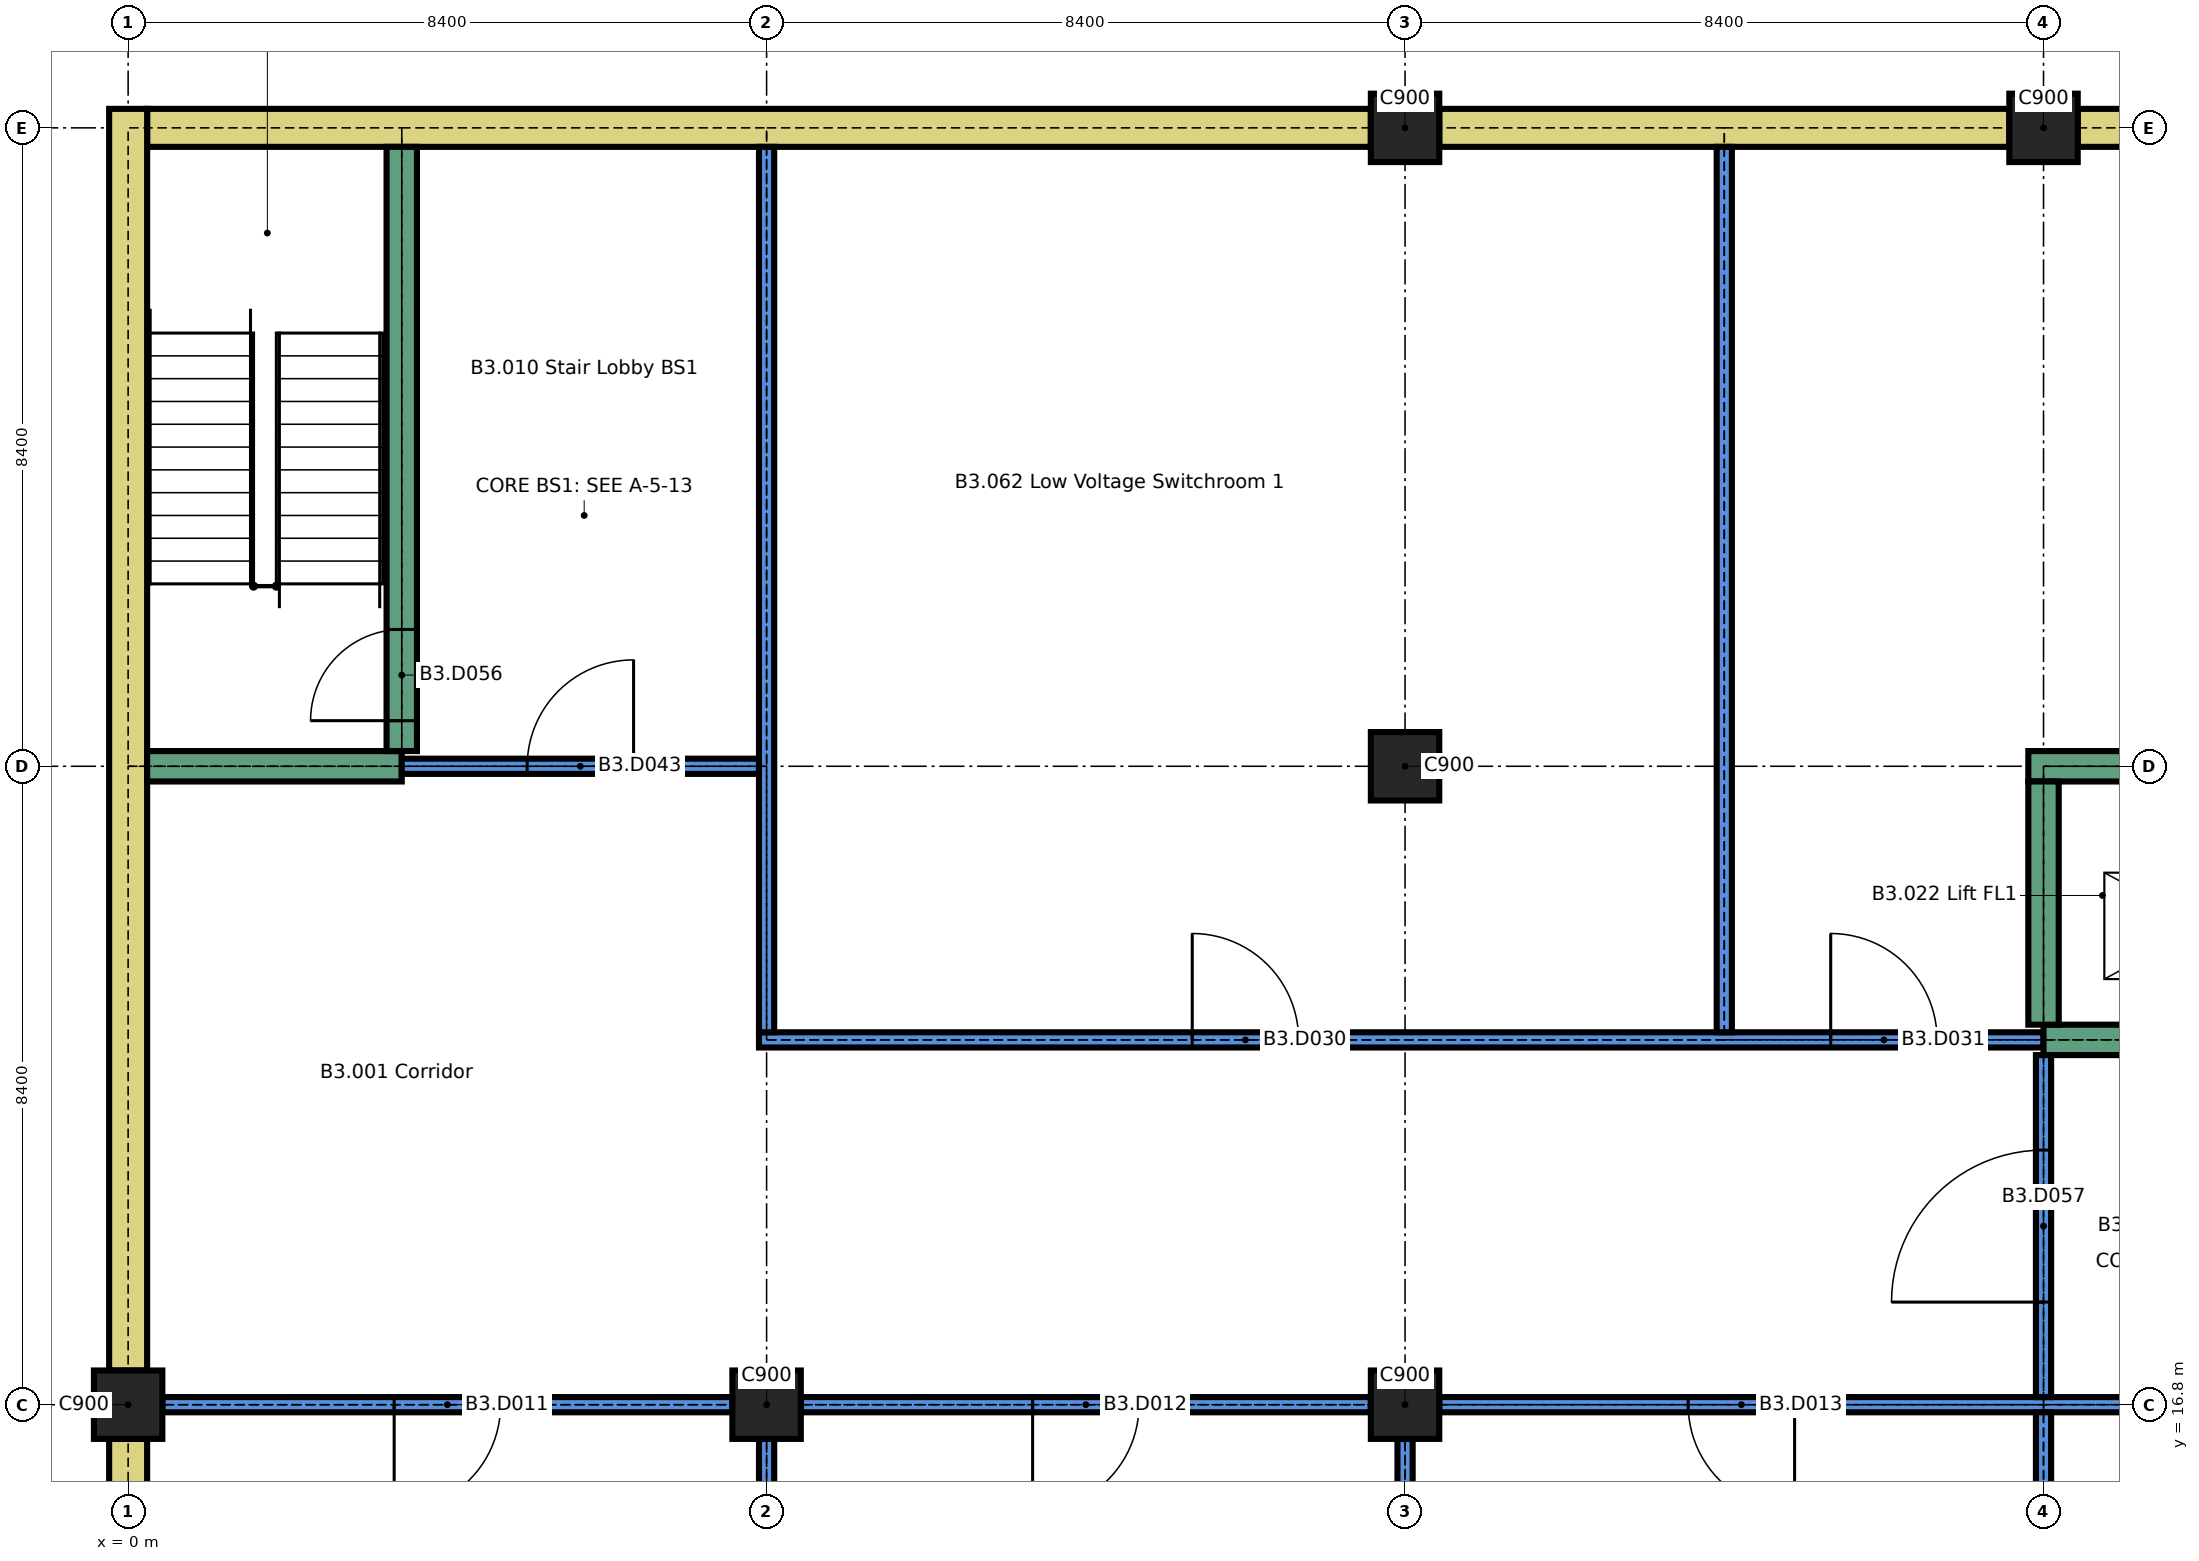
"""IFC4 building model, lengths in metres.
Left out: names, types, materials, properties, quantities, classifications, styles, units other than length and angle.
Written with IfcOpenShell. Run it as: python <this file> out.ifc"""

import sys

from ifc_helpers import new_model, si_unit, direction, frame, frame_2d, origin, origin_2d, place, context, subcontext, project, spatial, rectangle, extrude, element, fill, save


model = new_model("IFC4")
c1 = context("Model", 3, precision=1e-05, world=origin(), true_north=direction((0.0, 1.0)))
c2 = subcontext(c1, "Body", "Model", "MODEL_VIEW")
j1 = project(units=[si_unit("LENGTHUNIT", "METRE"), si_unit("PLANEANGLEUNIT", "RADIAN")], contexts=[c1])
p1 = place(None, origin())
s1 = spatial("IfcSite", under=j1, at=p1, CompositionType="ELEMENT")
p2 = place(p1, origin())
s2 = spatial("IfcBuilding", under=s1, at=p2, CompositionType="ELEMENT")
p3 = place(p2, frame((0.0, 0.0, -11.4)))
s3 = spatial("IfcBuildingStorey", under=s2, at=p3, CompositionType="ELEMENT", Elevation=-11.4)
for number, where, z_axis, x_axis in (
    (1, (0.0, 16.8, 0.0), (0.0, 0.0, 1.0), (1.0, 0.0, 0.0)),
    (2, (8.4, 16.8, 0.0), (0.0, 0.0, 1.0), (1.0, 0.0, 0.0)),
    (3, (16.8, 16.8, 0.0), (0.0, 0.0, 1.0), (1.0, 0.0, 0.0)),
    (4, (16.8, 25.2, 0.0), (0.0, 0.0, 1.0), (1.0, 0.0, 0.0)),
    (5, (16.8, 33.6, 0.0), (0.0, 0.0, 1.0), (1.0, 0.0, 0.0)),
    (6, (25.2, 33.6, 0.0), (0.0, 0.0, 1.0), (1.0, 0.0, 0.0)),
):
    element("IfcColumn", number, at=place(p3, frame(where, z_axis=z_axis, x_axis=x_axis)), inside=s3, PredefinedType="COLUMN", context=c2, shape_type="SweptSolid", body=[
        extrude(rectangle(XDim=0.9, YDim=0.9, at=origin_2d()), origin(), (0.0, 0.0, 1.0), 3.2),
    ])
p4 = place(p3, frame((0.25, 33.6, 0.0), z_axis=(0.0, 0.0, 1.0), x_axis=(1.0, 0.0, 0.0)))
e7 = element("IfcWall", 7, at=p4, inside=s3, PredefinedType="SOLIDWALL", context=c2, shape_type="SweptSolid", body=[
    extrude(rectangle(XDim=16.1, YDim=0.5, at=frame_2d((8.05, 0.0))), origin(), (0.0, 0.0, 1.0), 3.2),
])
for number, where, z_axis, x_axis in (
    (8, (17.25, 33.6, 0.0), (0.0, 0.0, 1.0), (1.0, 0.0, 0.0)),
    (9, (25.65, 33.6, 0.0), (0.0, 0.0, 1.0), (1.0, 0.0, 0.0)),
    (10, (0.0, 8.85, 0.0), (0.0, 0.0, 1.0), (0.0, 1.0, 0.0)),
):
    element("IfcWall", number, at=place(p3, frame(where, z_axis=z_axis, x_axis=x_axis)), inside=s3, PredefinedType="SOLIDWALL", context=c2, shape_type="SweptSolid", body=[
        extrude(rectangle(XDim=7.5, YDim=0.5, at=frame_2d((3.75, 0.0))), origin(), (0.0, 0.0, 1.0), 3.2),
    ])
p5 = place(p3, frame((0.0, 17.25, 0.0), z_axis=(0.0, 0.0, 1.0), x_axis=(0.0, 1.0, 0.0)))
e11 = element("IfcWall", 11, at=p5, inside=s3, PredefinedType="SOLIDWALL", context=c2, shape_type="SweptSolid", body=[
    extrude(rectangle(XDim=16.6, YDim=0.5, at=frame_2d((8.3, 0.0))), origin(), (0.0, 0.0, 1.0), 3.2),
])
p6 = place(p3, frame((0.45, 16.8, 0.0), z_axis=(0.0, 0.0, 1.0), x_axis=(1.0, 0.0, 0.0)))
e12 = element("IfcWall", 12, at=p6, inside=s3, PredefinedType="PARTITIONING", context=c2, shape_type="SweptSolid", body=[
    extrude(rectangle(XDim=7.5, YDim=0.2, at=frame_2d((3.75, 0.0))), origin(), (0.0, 0.0, 1.0), 3.2),
])
p7 = place(p6, frame((3.05, 0.0, 0.0)))
e13 = element("IfcOpeningElement", 13, at=p7, cuts=e12, PredefinedType="OPENING", context=c2, shape_type="SweptSolid", body=[
    extrude(rectangle(XDim=1.4, YDim=2.1, at=frame_2d((0.7, 1.05))), frame((0.0, 0.11, 0.0), z_axis=(0.0, -1.0, 0.0), x_axis=(1.0, 0.0, 0.0)), (0.0, 0.0, 1.0), 0.22),
])
p8 = place(p3, frame((8.85, 16.8, 0.0), z_axis=(0.0, 0.0, 1.0), x_axis=(1.0, 0.0, 0.0)))
e14 = element("IfcWall", 14, at=p8, inside=s3, PredefinedType="PARTITIONING", context=c2, shape_type="SweptSolid", body=[
    extrude(rectangle(XDim=7.5, YDim=0.2, at=frame_2d((3.75, 0.0))), origin(), (0.0, 0.0, 1.0), 3.2),
])
p9 = place(p8, frame((3.05, 0.0, 0.0)))
e15 = element("IfcOpeningElement", 15, at=p9, cuts=e14, PredefinedType="OPENING", context=c2, shape_type="SweptSolid", body=[
    extrude(rectangle(XDim=1.4, YDim=2.1, at=frame_2d((0.7, 1.05))), frame((0.0, 0.11, 0.0), z_axis=(0.0, -1.0, 0.0), x_axis=(1.0, 0.0, 0.0)), (0.0, 0.0, 1.0), 0.22),
])
p10 = place(p3, frame((17.25, 16.8, 0.0), z_axis=(0.0, 0.0, 1.0), x_axis=(1.0, 0.0, 0.0)))
e16 = element("IfcWall", 16, at=p10, inside=s3, PredefinedType="PARTITIONING", context=c2, shape_type="SweptSolid", body=[
    extrude(rectangle(XDim=15.9, YDim=0.2, at=frame_2d((7.95, 0.0))), origin(), (0.0, 0.0, 1.0), 3.2),
])
p11 = place(p10, frame((3.275, 0.0, 0.0)))
e17 = element("IfcOpeningElement", 17, at=p11, cuts=e16, PredefinedType="OPENING", context=c2, shape_type="SweptSolid", body=[
    extrude(rectangle(XDim=1.4, YDim=2.1, at=frame_2d((0.7, 1.05))), frame((0.0, 0.11, 0.0), z_axis=(0.0, -1.0, 0.0), x_axis=(1.0, 0.0, 0.0)), (0.0, 0.0, 1.0), 0.22),
])
p12 = place(p10, frame((13.325, 0.0, 0.0)))
e18 = element("IfcOpeningElement", 18, at=p12, cuts=e16, PredefinedType="OPENING", context=c2, shape_type="SweptSolid", body=[
    extrude(rectangle(XDim=1.4, YDim=2.1, at=frame_2d((0.7, 1.05))), frame((0.0, 0.11, 0.0), z_axis=(0.0, -1.0, 0.0), x_axis=(1.0, 0.0, 0.0)), (0.0, 0.0, 1.0), 0.22),
])
p13 = place(p3, frame((8.3, 21.6, 0.0), z_axis=(0.0, 0.0, 1.0), x_axis=(1.0, 0.0, 0.0)))
e19 = element("IfcWall", 19, at=p13, inside=s3, PredefinedType="PARTITIONING", context=c2, shape_type="SweptSolid", body=[
    extrude(rectangle(XDim=16.9, YDim=0.2, at=frame_2d((8.45, 0.0))), origin(), (0.0, 0.0, 1.0), 3.2),
])
p14 = place(p13, frame((5.7, 0.0, 0.0)))
e20 = element("IfcOpeningElement", 20, at=p14, cuts=e19, PredefinedType="OPENING", context=c2, shape_type="SweptSolid", body=[
    extrude(rectangle(XDim=1.4, YDim=2.1, at=frame_2d((0.7, 1.05))), frame((0.0, 0.11, 0.0), z_axis=(0.0, -1.0, 0.0), x_axis=(1.0, 0.0, 0.0)), (0.0, 0.0, 1.0), 0.22),
])
p15 = place(p13, frame((14.1, 0.0, 0.0)))
e21 = element("IfcOpeningElement", 21, at=p15, cuts=e19, PredefinedType="OPENING", context=c2, shape_type="SweptSolid", body=[
    extrude(rectangle(XDim=1.4, YDim=2.1, at=frame_2d((0.7, 1.05))), frame((0.0, 0.11, 0.0), z_axis=(0.0, -1.0, 0.0), x_axis=(1.0, 0.0, 0.0)), (0.0, 0.0, 1.0), 0.22),
])
p16 = place(p3, frame((25.2, 21.6, 0.0), z_axis=(0.0, 0.0, 1.0), x_axis=(1.0, 0.0, 0.0)))
e22 = element("IfcWall", 22, at=p16, inside=s3, PredefinedType="SHEAR", context=c2, shape_type="SweptSolid", body=[
    extrude(rectangle(XDim=4.2, YDim=0.4, at=frame_2d((2.1, 0.0))), origin(), (0.0, 0.0, 1.0), 3.2),
])
p17 = place(p16, frame((1.55, 0.0, 0.0)))
e23 = element("IfcOpeningElement", 23, at=p17, cuts=e22, PredefinedType="OPENING", context=c2, shape_type="SweptSolid", body=[
    extrude(rectangle(XDim=1.1, YDim=2.1, at=frame_2d((0.55, 1.05))), frame((0.0, 0.21, 0.0), z_axis=(0.0, -1.0, 0.0), x_axis=(1.0, 0.0, 0.0)), (0.0, 0.0, 1.0), 0.42),
])
p18 = place(p3, frame((0.25, 25.2, 0.0), z_axis=(0.0, 0.0, 1.0), x_axis=(1.0, 0.0, 0.0)))
e24 = element("IfcWall", 24, at=p18, inside=s3, PredefinedType="SHEAR", context=c2, shape_type="SweptSolid", body=[
    extrude(rectangle(XDim=3.35, YDim=0.4, at=frame_2d((1.675, 0.0))), origin(), (0.0, 0.0, 1.0), 3.2),
])
p19 = place(p3, frame((3.6, 25.2, 0.0), z_axis=(0.0, 0.0, 1.0), x_axis=(1.0, 0.0, 0.0)))
e25 = element("IfcWall", 25, at=p19, inside=s3, PredefinedType="PARTITIONING", context=c2, shape_type="SweptSolid", body=[
    extrude(rectangle(XDim=4.7, YDim=0.2, at=frame_2d((2.35, 0.0))), origin(), (0.0, 0.0, 1.0), 3.2),
])
p20 = place(p19, frame((1.65, 0.0, 0.0)))
e26 = element("IfcOpeningElement", 26, at=p20, cuts=e25, PredefinedType="OPENING", context=c2, shape_type="SweptSolid", body=[
    extrude(rectangle(XDim=1.4, YDim=2.1, at=frame_2d((0.7, 1.05))), frame((0.0, 0.11, 0.0), z_axis=(0.0, -1.0, 0.0), x_axis=(1.0, 0.0, 0.0)), (0.0, 0.0, 1.0), 0.22),
])
p21 = place(p3, frame((25.0, 25.2, 0.0), z_axis=(0.0, 0.0, 1.0), x_axis=(1.0, 0.0, 0.0)))
e27 = element("IfcWall", 27, at=p21, inside=s3, PredefinedType="SHEAR", context=c2, shape_type="SweptSolid", body=[
    extrude(rectangle(XDim=4.6, YDim=0.4, at=frame_2d((2.3, 0.0))), origin(), (0.0, 0.0, 1.0), 3.2),
])
p22 = place(p3, frame((3.6, 25.4, 0.0), z_axis=(0.0, 0.0, 1.0), x_axis=(0.0, 1.0, 0.0)))
e28 = element("IfcWall", 28, at=p22, inside=s3, PredefinedType="SHEAR", context=c2, shape_type="SweptSolid", body=[
    extrude(rectangle(XDim=7.95, YDim=0.4, at=frame_2d((3.975, 0.0))), origin(), (0.0, 0.0, 1.0), 3.2),
])
p23 = place(p22, frame((0.4, 0.0, 0.0)))
e29 = element("IfcOpeningElement", 29, at=p23, cuts=e28, PredefinedType="OPENING", context=c2, shape_type="SweptSolid", body=[
    extrude(rectangle(XDim=1.2, YDim=2.1, at=frame_2d((0.6, 1.05))), frame((0.0, 0.21, 0.0), z_axis=(0.0, -1.0, 0.0), x_axis=(1.0, 0.0, 0.0)), (0.0, 0.0, 1.0), 0.42),
])
p24 = place(p3, frame((8.4, 8.85, 0.0), z_axis=(0.0, 0.0, 1.0), x_axis=(0.0, 1.0, 0.0)))
e30 = element("IfcWall", 30, at=p24, inside=s3, PredefinedType="PARTITIONING", context=c2, shape_type="SweptSolid", body=[
    extrude(rectangle(XDim=7.5, YDim=0.2, at=frame_2d((3.75, 0.0))), origin(), (0.0, 0.0, 1.0), 3.2),
])
p25 = place(p3, frame((8.4, 21.7, 0.0), z_axis=(0.0, 0.0, 1.0), x_axis=(0.0, 1.0, 0.0)))
e31 = element("IfcWall", 31, at=p25, inside=s3, PredefinedType="PARTITIONING", context=c2, shape_type="SweptSolid", body=[
    extrude(rectangle(XDim=11.65, YDim=0.2, at=frame_2d((5.825, 0.0))), origin(), (0.0, 0.0, 1.0), 3.2),
])
p26 = place(p3, frame((16.8, 8.85, 0.0), z_axis=(0.0, 0.0, 1.0), x_axis=(0.0, 1.0, 0.0)))
e32 = element("IfcWall", 32, at=p26, inside=s3, PredefinedType="PARTITIONING", context=c2, shape_type="SweptSolid", body=[
    extrude(rectangle(XDim=7.5, YDim=0.2, at=frame_2d((3.75, 0.0))), origin(), (0.0, 0.0, 1.0), 3.2),
])
p27 = place(p3, frame((21.0, 21.7, 0.0), z_axis=(0.0, 0.0, 1.0), x_axis=(0.0, 1.0, 0.0)))
e33 = element("IfcWall", 33, at=p27, inside=s3, PredefinedType="PARTITIONING", context=c2, shape_type="SweptSolid", body=[
    extrude(rectangle(XDim=11.65, YDim=0.2, at=frame_2d((5.825, 0.0))), origin(), (0.0, 0.0, 1.0), 3.2),
])
p28 = place(p3, frame((25.2, 8.85, 0.0), z_axis=(0.0, 0.0, 1.0), x_axis=(0.0, 1.0, 0.0)))
e34 = element("IfcWall", 34, at=p28, inside=s3, PredefinedType="PARTITIONING", context=c2, shape_type="SweptSolid", body=[
    extrude(rectangle(XDim=7.85, YDim=0.2, at=frame_2d((3.925, 0.0))), origin(), (0.0, 0.0, 1.0), 3.2),
])
p29 = place(p3, frame((25.2, 16.9, 0.0), z_axis=(0.0, 0.0, 1.0), x_axis=(0.0, 1.0, 0.0)))
e35 = element("IfcWall", 35, at=p29, inside=s3, PredefinedType="PARTITIONING", context=c2, shape_type="SweptSolid", body=[
    extrude(rectangle(XDim=4.5, YDim=0.2, at=frame_2d((2.25, 0.0))), origin(), (0.0, 0.0, 1.0), 3.2),
])
p30 = place(p29, frame((1.25, 0.0, 0.0)))
e36 = element("IfcOpeningElement", 36, at=p30, cuts=e35, PredefinedType="OPENING", context=c2, shape_type="SweptSolid", body=[
    extrude(rectangle(XDim=2.0, YDim=2.4, at=frame_2d((1.0, 1.2))), frame((0.0, 0.11, 0.0), z_axis=(0.0, -1.0, 0.0), x_axis=(1.0, 0.0, 0.0)), (0.0, 0.0, 1.0), 0.22),
])
p31 = place(p3, frame((25.2, 21.8, 0.0), z_axis=(0.0, 0.0, 1.0), x_axis=(0.0, 1.0, 0.0)))
e37 = element("IfcWall", 37, at=p31, inside=s3, PredefinedType="SHEAR", context=c2, shape_type="SweptSolid", body=[
    extrude(rectangle(XDim=3.2, YDim=0.4, at=frame_2d((1.6, 0.0))), origin(), (0.0, 0.0, 1.0), 3.2),
])
p32 = place(p7, origin())
e38 = element("IfcDoor", 38, at=p32, inside=s3, OperationType="SINGLE_SWING_LEFT", PredefinedType="DOOR", context=c2, shape_type="SweptSolid", body=[
    extrude(rectangle(XDim=1.4, YDim=2.1, at=frame_2d((0.7, 1.05))), frame((0.0, 0.025, 0.0), z_axis=(0.0, -1.0, 0.0), x_axis=(1.0, 0.0, 0.0)), (0.0, 0.0, 1.0), 0.05),
])
fill(e13, e38)
p33 = place(p9, origin())
e39 = element("IfcDoor", 39, at=p33, inside=s3, OperationType="SINGLE_SWING_LEFT", PredefinedType="DOOR", context=c2, shape_type="SweptSolid", body=[
    extrude(rectangle(XDim=1.4, YDim=2.1, at=frame_2d((0.7, 1.05))), frame((0.0, 0.025, 0.0), z_axis=(0.0, -1.0, 0.0), x_axis=(1.0, 0.0, 0.0)), (0.0, 0.0, 1.0), 0.05),
])
fill(e15, e39)
p34 = place(p11, origin())
e40 = element("IfcDoor", 40, at=p34, inside=s3, OperationType="SINGLE_SWING_RIGHT", PredefinedType="DOOR", context=c2, shape_type="SweptSolid", body=[
    extrude(rectangle(XDim=1.4, YDim=2.1, at=frame_2d((0.7, 1.05))), frame((0.0, 0.025, 0.0), z_axis=(0.0, -1.0, 0.0), x_axis=(1.0, 0.0, 0.0)), (0.0, 0.0, 1.0), 0.05),
])
fill(e17, e40)
p35 = place(p14, origin())
e41 = element("IfcDoor", 41, at=p35, inside=s3, OperationType="SINGLE_SWING_RIGHT", PredefinedType="DOOR", context=c2, shape_type="SweptSolid", body=[
    extrude(rectangle(XDim=1.4, YDim=2.1, at=frame_2d((0.7, 1.05))), frame((0.0, 0.025, 0.0), z_axis=(0.0, -1.0, 0.0), x_axis=(1.0, 0.0, 0.0)), (0.0, 0.0, 1.0), 0.05),
])
fill(e20, e41)
p36 = place(p15, origin())
e42 = element("IfcDoor", 42, at=p36, inside=s3, OperationType="SINGLE_SWING_RIGHT", PredefinedType="DOOR", context=c2, shape_type="SweptSolid", body=[
    extrude(rectangle(XDim=1.4, YDim=2.1, at=frame_2d((0.7, 1.05))), frame((0.0, 0.025, 0.0), z_axis=(0.0, -1.0, 0.0), x_axis=(1.0, 0.0, 0.0)), (0.0, 0.0, 1.0), 0.05),
])
fill(e21, e42)
p37 = place(p20, origin())
e43 = element("IfcDoor", 43, at=p37, inside=s3, OperationType="SINGLE_SWING_LEFT", PredefinedType="DOOR", context=c2, shape_type="SweptSolid", body=[
    extrude(rectangle(XDim=1.4, YDim=2.1, at=frame_2d((0.7, 1.05))), frame((0.0, 0.03, 0.0), z_axis=(0.0, -1.0, 0.0), x_axis=(1.0, 0.0, 0.0)), (0.0, 0.0, 1.0), 0.06),
])
fill(e26, e43)
p38 = place(p23, origin())
e44 = element("IfcDoor", 44, at=p38, inside=s3, OperationType="SINGLE_SWING_RIGHT", PredefinedType="DOOR", context=c2, shape_type="SweptSolid", body=[
    extrude(rectangle(XDim=1.2, YDim=2.1, at=frame_2d((0.6, 1.05))), frame((0.0, 0.025, 0.0), z_axis=(0.0, -1.0, 0.0), x_axis=(1.0, 0.0, 0.0)), (0.0, 0.0, 1.0), 0.05),
])
fill(e29, e44)
p39 = place(p30, origin())
e45 = element("IfcDoor", 45, at=p39, inside=s3, OperationType="SINGLE_SWING_RIGHT", PredefinedType="DOOR", context=c2, shape_type="SweptSolid", body=[
    extrude(rectangle(XDim=2.0, YDim=2.4, at=frame_2d((1.0, 1.2))), frame((0.0, 0.03, 0.0), z_axis=(0.0, -1.0, 0.0), x_axis=(1.0, 0.0, 0.0)), (0.0, 0.0, 1.0), 0.06),
])
fill(e36, e45)
save(model, sys.argv[1])
